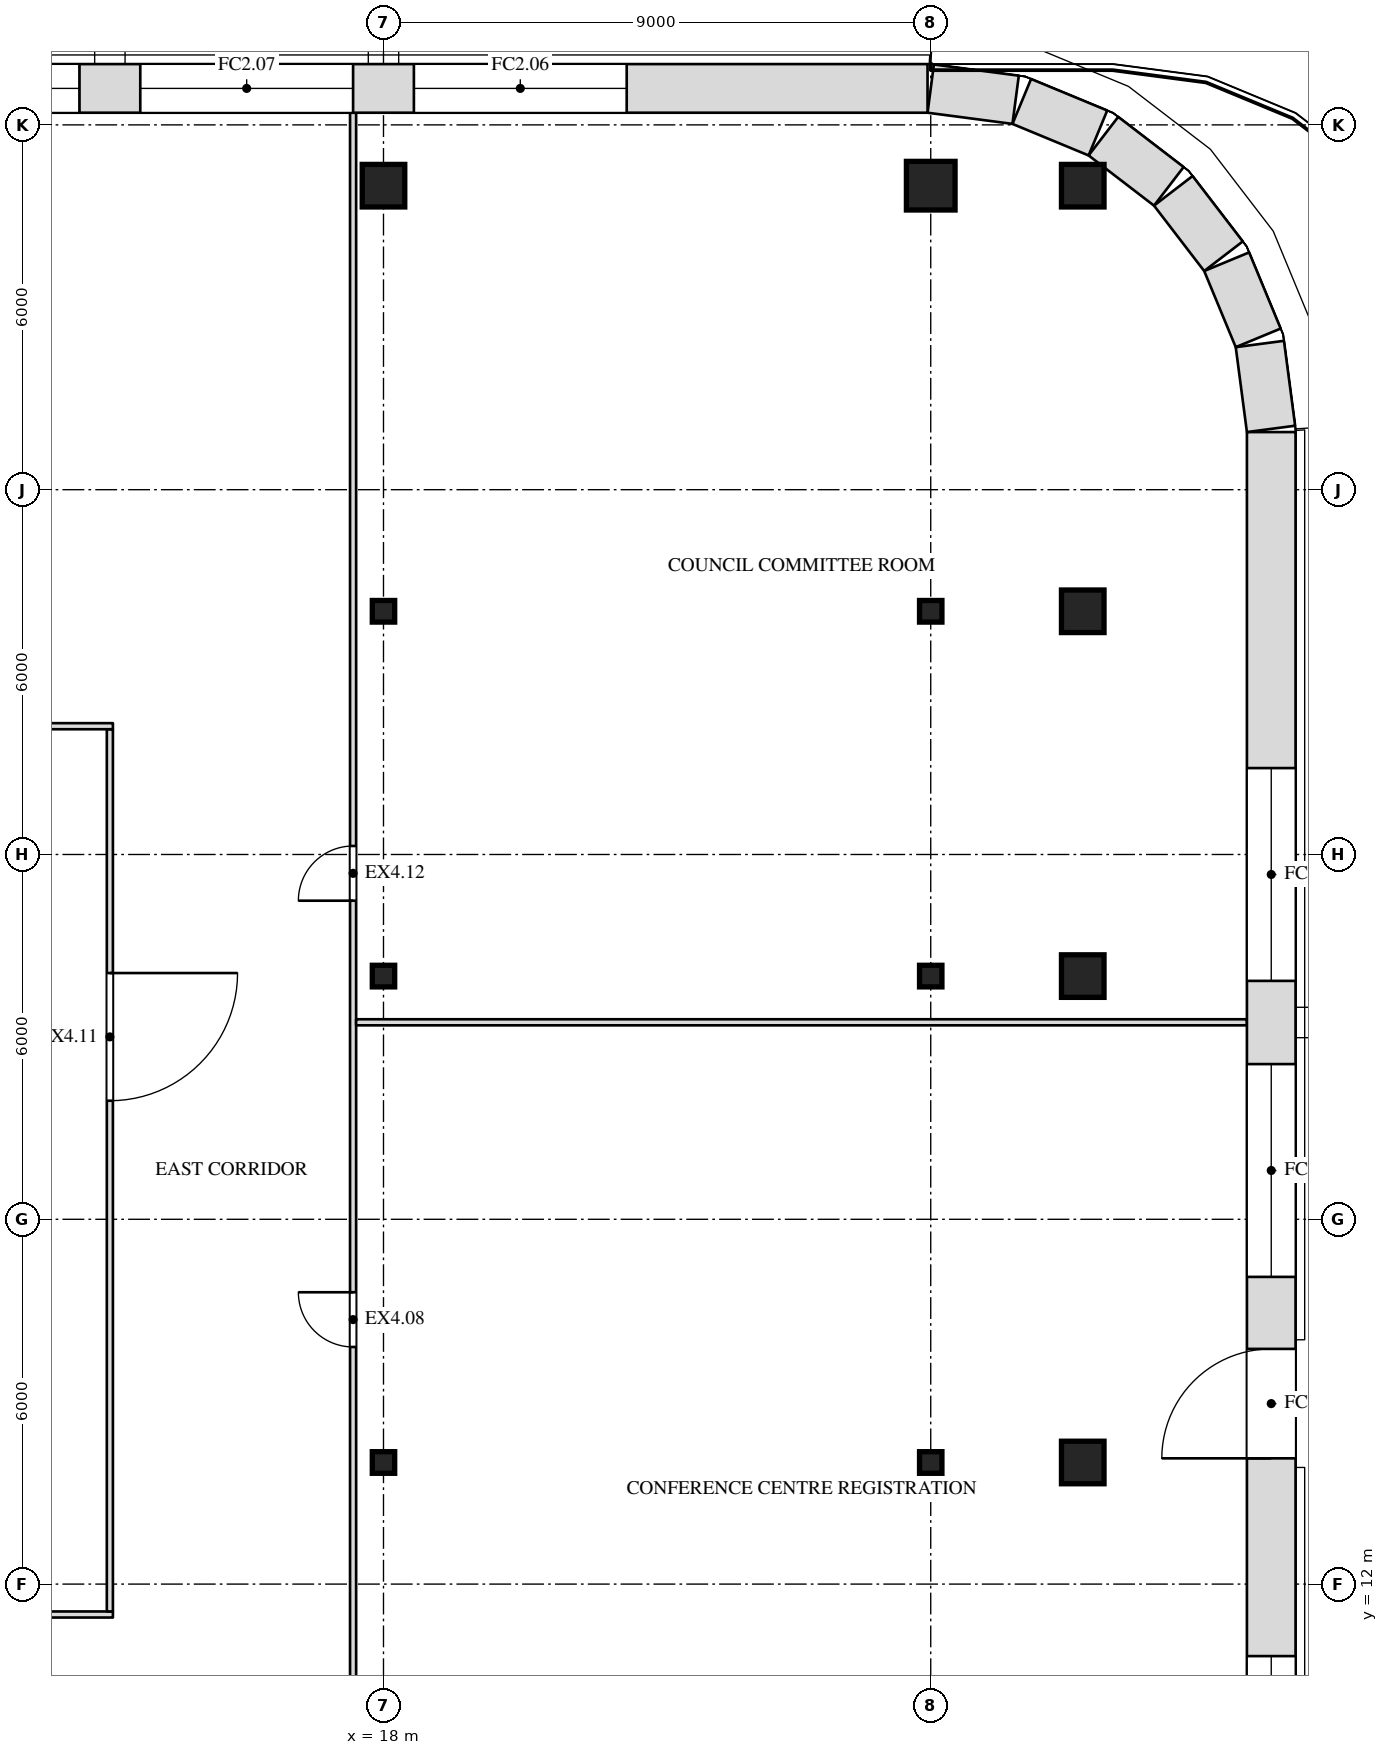
"""IFC4 building model, lengths in metres.
Left out: names, types, materials, properties, quantities, classifications, styles, units other than length and angle.
Written with IfcOpenShell. Run it as: python <this file> out.ifc"""

import sys

from ifc_helpers import new_model, si_unit, direction, frame, frame_2d, origin, origin_2d, place, context, subcontext, project, spatial, rectangle, i_section, extrude, element, fill, save


model = new_model("IFC4")
c1 = context("Model", 3, precision=1e-05, world=origin(), true_north=direction((0.0, 1.0)))
c2 = subcontext(c1, "Body", "Model", "MODEL_VIEW")
j1 = project(units=[si_unit("LENGTHUNIT", "METRE"), si_unit("PLANEANGLEUNIT", "RADIAN")], contexts=[c1])
p1 = place(None, origin())
s1 = spatial("IfcSite", under=j1, at=p1, CompositionType="ELEMENT")
p2 = place(p1, origin())
s2 = spatial("IfcBuilding", under=s1, at=p2, CompositionType="ELEMENT")
p3 = place(p2, frame((0.0, 0.0, 284.5)))
s3 = spatial("IfcBuildingStorey", under=s2, at=p3, CompositionType="ELEMENT", Elevation=284.5)
for number, where, z_axis, x_axis in (
    (1, (18.0, 14.0, 0.0), (0.0, 0.0, 1.0), (1.0, 0.0, 0.0)),
    (2, (27.0, 14.0, 0.0), (0.0, 0.0, 1.0), (1.0, 0.0, 0.0)),
):
    element("IfcColumn", number, at=place(p3, frame(where, z_axis=z_axis, x_axis=x_axis)), inside=s3, PredefinedType="COLUMN", context=c2, shape_type="SweptSolid", body=[
        extrude(i_section(OverallWidth=0.368, OverallDepth=0.356, WebThickness=0.011, FlangeThickness=0.018, at=origin_2d()), origin(), (0.0, 0.0, 1.0), 4.0),
    ])
p4 = place(p3, frame((29.5, 14.0, 0.0), z_axis=(0.0, 0.0, 1.0), x_axis=(1.0, 0.0, 0.0)))
e3 = element("IfcColumn", 3, at=p4, inside=s3, PredefinedType="COLUMN", context=c2, shape_type="SweptSolid", body=[
    extrude(rectangle(XDim=0.7, YDim=0.7, at=origin_2d()), origin(), (0.0, 0.0, 1.0), 4.0),
])
for number, where, z_axis, x_axis in (
    (4, (18.0, 22.0, 0.0), (0.0, 0.0, 1.0), (1.0, 0.0, 0.0)),
    (5, (27.0, 22.0, 0.0), (0.0, 0.0, 1.0), (1.0, 0.0, 0.0)),
):
    element("IfcColumn", number, at=place(p3, frame(where, z_axis=z_axis, x_axis=x_axis)), inside=s3, PredefinedType="COLUMN", context=c2, shape_type="SweptSolid", body=[
        extrude(i_section(OverallWidth=0.368, OverallDepth=0.356, WebThickness=0.011, FlangeThickness=0.018, at=origin_2d()), origin(), (0.0, 0.0, 1.0), 4.0),
    ])
p5 = place(p3, frame((29.5, 22.0, 0.0), z_axis=(0.0, 0.0, 1.0), x_axis=(1.0, 0.0, 0.0)))
e6 = element("IfcColumn", 6, at=p5, inside=s3, PredefinedType="COLUMN", context=c2, shape_type="SweptSolid", body=[
    extrude(rectangle(XDim=0.7, YDim=0.7, at=origin_2d()), origin(), (0.0, 0.0, 1.0), 4.0),
])
for number, where, z_axis, x_axis in (
    (7, (18.0, 28.0, 0.0), (0.0, 0.0, 1.0), (1.0, 0.0, 0.0)),
    (8, (27.0, 28.0, 0.0), (0.0, 0.0, 1.0), (1.0, 0.0, 0.0)),
):
    element("IfcColumn", number, at=place(p3, frame(where, z_axis=z_axis, x_axis=x_axis)), inside=s3, PredefinedType="COLUMN", context=c2, shape_type="SweptSolid", body=[
        extrude(i_section(OverallWidth=0.368, OverallDepth=0.356, WebThickness=0.011, FlangeThickness=0.018, at=origin_2d()), origin(), (0.0, 0.0, 1.0), 4.0),
    ])
for number, where, z_axis, x_axis in (
    (9, (29.5, 28.0, 0.0), (0.0, 0.0, 1.0), (1.0, 0.0, 0.0)),
    (10, (18.0, 35.0, 0.0), (0.0, 0.0, 1.0), (1.0, 0.0, 0.0)),
):
    element("IfcColumn", number, at=place(p3, frame(where, z_axis=z_axis, x_axis=x_axis)), inside=s3, PredefinedType="COLUMN", context=c2, shape_type="SweptSolid", body=[
        extrude(rectangle(XDim=0.7, YDim=0.7, at=origin_2d()), origin(), (0.0, 0.0, 1.0), 4.0),
    ])
p6 = place(p3, frame((27.0, 35.0, 0.0), z_axis=(0.0, 0.0, 1.0), x_axis=(1.0, 0.0, 0.0)))
e11 = element("IfcColumn", 11, at=p6, inside=s3, PredefinedType="COLUMN", context=c2, shape_type="SweptSolid", body=[
    extrude(rectangle(XDim=0.8, YDim=0.8, at=origin_2d()), origin(), (0.0, 0.0, 1.0), 4.0),
])
p7 = place(p3, frame((29.5, 35.0, 0.0), z_axis=(0.0, 0.0, 1.0), x_axis=(1.0, 0.0, 0.0)))
e12 = element("IfcColumn", 12, at=p7, inside=s3, PredefinedType="COLUMN", context=c2, shape_type="SweptSolid", body=[
    extrude(rectangle(XDim=0.7, YDim=0.7, at=origin_2d()), origin(), (0.0, 0.0, 1.0), 4.0),
])
p8 = place(p3, frame((17.5, 6.68, 0.0), z_axis=(0.0, 0.0, 1.0), x_axis=(0.0, 1.0, 0.0)))
e13 = element("IfcWall", 13, at=p8, inside=s3, PredefinedType="PARTITIONING", context=c2, shape_type="SweptSolid", body=[
    extrude(rectangle(XDim=29.52, YDim=0.1, at=frame_2d((14.76, 0.0))), origin(), (0.0, 0.0, 1.0), 3.78),
])
p9 = place(p8, frame((9.22, 0.0, 0.0)))
e14 = element("IfcOpeningElement", 14, at=p9, cuts=e13, PredefinedType="OPENING", context=c2, shape_type="SweptSolid", body=[
    extrude(rectangle(XDim=0.9, YDim=2.1, at=frame_2d((0.45, 1.05))), frame((0.0, 0.062, 0.0), z_axis=(0.0, -1.0, 0.0), x_axis=(1.0, 0.0, 0.0)), (0.0, 0.0, 1.0), 0.124),
])
p10 = place(p8, frame((16.56, 0.0, 0.0)))
e15 = element("IfcOpeningElement", 15, at=p10, cuts=e13, PredefinedType="OPENING", context=c2, shape_type="SweptSolid", body=[
    extrude(rectangle(XDim=0.9, YDim=2.1, at=frame_2d((0.45, 1.05))), frame((0.0, 0.062, 0.0), z_axis=(0.0, -1.0, 0.0), x_axis=(1.0, 0.0, 0.0)), (0.0, 0.0, 1.0), 0.124),
])
p11 = place(p3, frame((-13.55, 11.5, 0.0), z_axis=(0.0, 0.0, 1.0), x_axis=(1.0, 0.0, 0.0)))
e16 = element("IfcWall", 16, at=p11, inside=s3, PredefinedType="PARTITIONING", context=c2, shape_type="SweptSolid", body=[
    extrude(rectangle(XDim=27.1, YDim=0.1, at=frame_2d((13.55, 0.0))), origin(), (0.0, 0.0, 1.0), 3.78),
])
p12 = place(p11, frame((3.5, 0.0, 0.0)))
e17 = element("IfcOpeningElement", 17, at=p12, cuts=e16, PredefinedType="OPENING", context=c2, shape_type="SweptSolid", body=[
    extrude(rectangle(XDim=2.1, YDim=2.4, at=frame_2d((1.05, 1.2))), frame((0.0, 0.062, 0.0), z_axis=(0.0, -1.0, 0.0), x_axis=(1.0, 0.0, 0.0)), (0.0, 0.0, 1.0), 0.124),
])
p13 = place(p3, frame((13.5, 11.55, 0.0), z_axis=(0.0, 0.0, 1.0), x_axis=(0.0, 1.0, 0.0)))
e18 = element("IfcWall", 18, at=p13, inside=s3, PredefinedType="PARTITIONING", context=c2, shape_type="SweptSolid", body=[
    extrude(rectangle(XDim=14.51, YDim=0.1, at=frame_2d((7.255, 0.0))), origin(), (0.0, 0.0, 1.0), 3.247),
])
p14 = place(p13, frame((8.4, 0.0, 0.0)))
e19 = element("IfcOpeningElement", 19, at=p14, cuts=e18, PredefinedType="OPENING", context=c2, shape_type="SweptSolid", body=[
    extrude(rectangle(XDim=2.1, YDim=2.4, at=frame_2d((1.05, 1.2))), frame((0.0, 0.062, 0.0), z_axis=(0.0, -1.0, 0.0), x_axis=(1.0, 0.0, 0.0)), (0.0, 0.0, 1.0), 0.124),
])
p15 = place(p3, frame((17.55, 21.24, 0.0), z_axis=(0.0, 0.0, 1.0), x_axis=(1.0, 0.0, 0.0)))
e20 = element("IfcWall", 20, at=p15, inside=s3, PredefinedType="PARTITIONING", context=c2, shape_type="SweptSolid", body=[
    extrude(rectangle(XDim=14.65, YDim=0.1, at=frame_2d((7.325, 0.0))), origin(), (0.0, 0.0, 1.0), 3.78),
])
p16 = place(p3, frame((-13.55, 26.11, 0.0), z_axis=(0.0, 0.0, 1.0), x_axis=(1.0, 0.0, 0.0)))
e21 = element("IfcWall", 21, at=p16, inside=s3, PredefinedType="PARTITIONING", context=c2, shape_type="SweptSolid", body=[
    extrude(rectangle(XDim=27.1, YDim=0.1, at=frame_2d((13.55, 0.0))), origin(), (0.0, 0.0, 1.0), 3.78),
])
p17 = place(p16, frame((21.5, 0.0, 0.0)))
e22 = element("IfcOpeningElement", 22, at=p17, cuts=e21, PredefinedType="OPENING", context=c2, shape_type="SweptSolid", body=[
    extrude(rectangle(XDim=2.1, YDim=2.4, at=frame_2d((1.05, 1.2))), frame((0.0, 0.062, 0.0), z_axis=(0.0, -1.0, 0.0), x_axis=(1.0, 0.0, 0.0)), (0.0, 0.0, 1.0), 0.124),
])
p18 = place(p3, frame((32.6, -7.948, 0.0), z_axis=(0.0, 0.0, 1.0), x_axis=(0.0, 1.0, 0.0)))
e23 = element("IfcWall", 23, at=p18, inside=s3, PredefinedType="SOLIDWALL", context=c2, shape_type="SweptSolid", body=[
    extrude(rectangle(XDim=38.895, YDim=0.8, at=frame_2d((19.448, 0.0))), origin(), (0.0, 0.0, 1.0), 3.78),
])
p19 = place(p18, frame((5.526, 0.0, 1.0)))
e24 = element("IfcOpeningElement", 24, at=p19, cuts=e23, PredefinedType="OPENING", context=c2, shape_type="SweptSolid", body=[
    extrude(rectangle(XDim=3.5, YDim=2.5, at=frame_2d((1.75, 1.25))), frame((0.0, 0.412, 0.0), z_axis=(0.0, -1.0, 0.0), x_axis=(1.0, 0.0, 0.0)), (0.0, 0.0, 1.0), 0.824),
])
p20 = place(p18, frame((10.395, 0.0, 1.0)))
e25 = element("IfcOpeningElement", 25, at=p20, cuts=e23, PredefinedType="OPENING", context=c2, shape_type="SweptSolid", body=[
    extrude(rectangle(XDim=3.5, YDim=2.5, at=frame_2d((1.75, 1.25))), frame((0.0, 0.412, 0.0), z_axis=(0.0, -1.0, 0.0), x_axis=(1.0, 0.0, 0.0)), (0.0, 0.0, 1.0), 0.824),
])
p21 = place(p18, frame((15.263, 0.0, 1.0)))
e26 = element("IfcOpeningElement", 26, at=p21, cuts=e23, PredefinedType="OPENING", context=c2, shape_type="SweptSolid", body=[
    extrude(rectangle(XDim=3.5, YDim=2.5, at=frame_2d((1.75, 1.25))), frame((0.0, 0.412, 0.0), z_axis=(0.0, -1.0, 0.0), x_axis=(1.0, 0.0, 0.0)), (0.0, 0.0, 1.0), 0.824),
])
p22 = place(p18, frame((25.0, 0.0, 1.0)))
e27 = element("IfcOpeningElement", 27, at=p22, cuts=e23, PredefinedType="OPENING", context=c2, shape_type="SweptSolid", body=[
    extrude(rectangle(XDim=3.5, YDim=2.5, at=frame_2d((1.75, 1.25))), frame((0.0, 0.412, 0.0), z_axis=(0.0, -1.0, 0.0), x_axis=(1.0, 0.0, 0.0)), (0.0, 0.0, 1.0), 0.824),
])
p23 = place(p18, frame((29.869, 0.0, 1.0)))
e28 = element("IfcOpeningElement", 28, at=p23, cuts=e23, PredefinedType="OPENING", context=c2, shape_type="SweptSolid", body=[
    extrude(rectangle(XDim=3.5, YDim=2.5, at=frame_2d((1.75, 1.25))), frame((0.0, 0.412, 0.0), z_axis=(0.0, -1.0, 0.0), x_axis=(1.0, 0.0, 0.0)), (0.0, 0.0, 1.0), 0.824),
])
p24 = place(p18, frame((22.016, 0.0, 0.0)))
e29 = element("IfcOpeningElement", 29, at=p24, cuts=e23, PredefinedType="OPENING", context=c2, shape_type="SweptSolid", body=[
    extrude(rectangle(XDim=1.8, YDim=2.4, at=frame_2d((0.9, 1.2))), frame((0.0, 0.412, 0.0), z_axis=(0.0, -1.0, 0.0), x_axis=(1.0, 0.0, 0.0)), (0.0, 0.0, 1.0), 0.824),
])
p25 = place(p3, frame((32.597, 31.0, 0.0), z_axis=(0.0, 0.0, 1.0), x_axis=(-0.130517283865, 0.99144603414, 0.0)))
e30 = element("IfcWall", 30, at=p25, inside=s3, PredefinedType="SOLIDWALL", context=c2, shape_type="SweptSolid", body=[
    extrude(rectangle(XDim=1.408, YDim=0.8, at=frame_2d((0.704, 0.0))), origin(), (0.0, 0.0, 1.0), 3.78),
])
p26 = place(p3, frame((32.386, 32.497, 0.0), z_axis=(0.0, 0.0, 1.0), x_axis=(-0.38276009378, 0.923847774587, 0.0)))
e31 = element("IfcWall", 31, at=p26, inside=s3, PredefinedType="SOLIDWALL", context=c2, shape_type="SweptSolid", body=[
    extrude(rectangle(XDim=1.355, YDim=0.8, at=frame_2d((0.678, 0.0))), origin(), (0.0, 0.0, 1.0), 3.78),
])
for number, where, z_axis, x_axis in (
    (32, (31.815, 33.84, 0.0), (0.0, 0.0, 1.0), (-0.609, 0.793, 0.0)),
    (33, (30.916, 34.989, 0.0), (0.0, 0.0, 1.0), (-0.793, 0.609, 0.0)),
):
    element("IfcWall", number, at=place(p3, frame(where, z_axis=z_axis, x_axis=x_axis)), inside=s3, PredefinedType="SOLIDWALL", context=c2, shape_type="SweptSolid", body=[
        extrude(rectangle(XDim=1.356, YDim=0.8, at=frame_2d((0.678, 0.0))), origin(), (0.0, 0.0, 1.0), 3.78),
    ])
p27 = place(p3, frame((29.75, 35.867, 0.0), z_axis=(0.0, 0.0, 1.0), x_axis=(-0.923847774587, 0.38276009378, 0.0)))
e34 = element("IfcWall", 34, at=p27, inside=s3, PredefinedType="SOLIDWALL", context=c2, shape_type="SweptSolid", body=[
    extrude(rectangle(XDim=1.355, YDim=0.8, at=frame_2d((0.678, 0.0))), origin(), (0.0, 0.0, 1.0), 3.78),
])
p28 = place(p3, frame((28.396, 36.413, 0.0), z_axis=(0.0, 0.0, 1.0), x_axis=(-0.99144603414, 0.130517283865, 0.0)))
e35 = element("IfcWall", 35, at=p28, inside=s3, PredefinedType="SOLIDWALL", context=c2, shape_type="SweptSolid", body=[
    extrude(rectangle(XDim=1.408, YDim=0.8, at=frame_2d((0.704, 0.0))), origin(), (0.0, 0.0, 1.0), 3.78),
])
p29 = place(p3, frame((26.948, 36.6, 0.0), z_axis=(0.0, 0.0, 1.0), x_axis=(-1.0, 0.0, 0.0)))
e36 = element("IfcWall", 36, at=p29, inside=s3, PredefinedType="SOLIDWALL", context=c2, shape_type="SweptSolid", body=[
    extrude(rectangle(XDim=53.895, YDim=0.8, at=frame_2d((26.948, 0.0))), origin(), (0.0, 0.0, 1.0), 3.78),
])
p30 = place(p29, frame((4.948, 0.0, 1.0)))
e37 = element("IfcOpeningElement", 37, at=p30, cuts=e36, PredefinedType="OPENING", context=c2, shape_type="SweptSolid", body=[
    extrude(rectangle(XDim=3.5, YDim=2.5, at=frame_2d((1.75, 1.25))), frame((0.0, 0.412, 0.0), z_axis=(0.0, -1.0, 0.0), x_axis=(1.0, 0.0, 0.0)), (0.0, 0.0, 1.0), 0.824),
])
p31 = place(p29, frame((9.448, 0.0, 1.0)))
e38 = element("IfcOpeningElement", 38, at=p31, cuts=e36, PredefinedType="OPENING", context=c2, shape_type="SweptSolid", body=[
    extrude(rectangle(XDim=3.5, YDim=2.5, at=frame_2d((1.75, 1.25))), frame((0.0, 0.412, 0.0), z_axis=(0.0, -1.0, 0.0), x_axis=(1.0, 0.0, 0.0)), (0.0, 0.0, 1.0), 0.824),
])
p32 = place(p29, frame((13.948, 0.0, 1.0)))
e39 = element("IfcOpeningElement", 39, at=p32, cuts=e36, PredefinedType="OPENING", context=c2, shape_type="SweptSolid", body=[
    extrude(rectangle(XDim=3.5, YDim=2.5, at=frame_2d((1.75, 1.25))), frame((0.0, 0.412, 0.0), z_axis=(0.0, -1.0, 0.0), x_axis=(1.0, 0.0, 0.0)), (0.0, 0.0, 1.0), 0.824),
])
p33 = place(p29, frame((18.448, 0.0, 1.0)))
e40 = element("IfcOpeningElement", 40, at=p33, cuts=e36, PredefinedType="OPENING", context=c2, shape_type="SweptSolid", body=[
    extrude(rectangle(XDim=3.5, YDim=2.5, at=frame_2d((1.75, 1.25))), frame((0.0, 0.412, 0.0), z_axis=(0.0, -1.0, 0.0), x_axis=(1.0, 0.0, 0.0)), (0.0, 0.0, 1.0), 0.824),
])
p34 = place(p29, frame((22.948, 0.0, 1.0)))
e41 = element("IfcOpeningElement", 41, at=p34, cuts=e36, PredefinedType="OPENING", context=c2, shape_type="SweptSolid", body=[
    extrude(rectangle(XDim=3.5, YDim=2.5, at=frame_2d((1.75, 1.25))), frame((0.0, 0.412, 0.0), z_axis=(0.0, -1.0, 0.0), x_axis=(1.0, 0.0, 0.0)), (0.0, 0.0, 1.0), 0.824),
])
p35 = place(p29, frame((27.448, 0.0, 1.0)))
e42 = element("IfcOpeningElement", 42, at=p35, cuts=e36, PredefinedType="OPENING", context=c2, shape_type="SweptSolid", body=[
    extrude(rectangle(XDim=3.5, YDim=2.5, at=frame_2d((1.75, 1.25))), frame((0.0, 0.412, 0.0), z_axis=(0.0, -1.0, 0.0), x_axis=(1.0, 0.0, 0.0)), (0.0, 0.0, 1.0), 0.824),
])
p36 = place(p29, frame((31.948, 0.0, 1.0)))
e43 = element("IfcOpeningElement", 43, at=p36, cuts=e36, PredefinedType="OPENING", context=c2, shape_type="SweptSolid", body=[
    extrude(rectangle(XDim=3.5, YDim=2.5, at=frame_2d((1.75, 1.25))), frame((0.0, 0.412, 0.0), z_axis=(0.0, -1.0, 0.0), x_axis=(1.0, 0.0, 0.0)), (0.0, 0.0, 1.0), 0.824),
])
p37 = place(p29, frame((36.448, 0.0, 1.0)))
e44 = element("IfcOpeningElement", 44, at=p37, cuts=e36, PredefinedType="OPENING", context=c2, shape_type="SweptSolid", body=[
    extrude(rectangle(XDim=3.5, YDim=2.5, at=frame_2d((1.75, 1.25))), frame((0.0, 0.412, 0.0), z_axis=(0.0, -1.0, 0.0), x_axis=(1.0, 0.0, 0.0)), (0.0, 0.0, 1.0), 0.824),
])
p38 = place(p29, frame((40.948, 0.0, 1.0)))
e45 = element("IfcOpeningElement", 45, at=p38, cuts=e36, PredefinedType="OPENING", context=c2, shape_type="SweptSolid", body=[
    extrude(rectangle(XDim=3.5, YDim=2.5, at=frame_2d((1.75, 1.25))), frame((0.0, 0.412, 0.0), z_axis=(0.0, -1.0, 0.0), x_axis=(1.0, 0.0, 0.0)), (0.0, 0.0, 1.0), 0.824),
])
p39 = place(p29, frame((45.448, 0.0, 1.0)))
e46 = element("IfcOpeningElement", 46, at=p39, cuts=e36, PredefinedType="OPENING", context=c2, shape_type="SweptSolid", body=[
    extrude(rectangle(XDim=3.5, YDim=2.5, at=frame_2d((1.75, 1.25))), frame((0.0, 0.412, 0.0), z_axis=(0.0, -1.0, 0.0), x_axis=(1.0, 0.0, 0.0)), (0.0, 0.0, 1.0), 0.824),
])
p40 = place(p9, origin())
e47 = element("IfcDoor", 47, at=p40, inside=s3, OperationType="SINGLE_SWING_RIGHT", PredefinedType="DOOR", context=c2, shape_type="SweptSolid", body=[
    extrude(rectangle(XDim=0.9, YDim=2.1, at=frame_2d((0.45, 1.05))), frame((0.0, 0.025, 0.0), z_axis=(0.0, -1.0, 0.0), x_axis=(1.0, 0.0, 0.0)), (0.0, 0.0, 1.0), 0.05),
])
fill(e14, e47)
p41 = place(p14, origin())
e48 = element("IfcDoor", 48, at=p41, inside=s3, OperationType="DOUBLE_DOOR_SINGLE_SWING", PredefinedType="DOOR", context=c2, shape_type="SweptSolid", body=[
    extrude(rectangle(XDim=2.1, YDim=2.4, at=frame_2d((1.05, 1.2))), frame((0.0, 0.025, 0.0), z_axis=(0.0, -1.0, 0.0), x_axis=(1.0, 0.0, 0.0)), (0.0, 0.0, 1.0), 0.05),
])
fill(e19, e48)
p42 = place(p10, origin())
e49 = element("IfcDoor", 49, at=p42, inside=s3, OperationType="SINGLE_SWING_LEFT", PredefinedType="DOOR", context=c2, shape_type="SweptSolid", body=[
    extrude(rectangle(XDim=0.9, YDim=2.1, at=frame_2d((0.45, 1.05))), frame((0.0, 0.025, 0.0), z_axis=(0.0, -1.0, 0.0), x_axis=(1.0, 0.0, 0.0)), (0.0, 0.0, 1.0), 0.05),
])
fill(e15, e49)
p43 = place(p21, origin())
e50 = element("IfcWindow", 50, at=p43, inside=s3, PartitioningType="SINGLE_PANEL", PredefinedType="WINDOW", context=c2, shape_type="SweptSolid", body=[
    extrude(rectangle(XDim=3.5, YDim=2.5, at=frame_2d((1.75, 1.25))), frame((0.0, 0.03, 0.0), z_axis=(0.0, -1.0, 0.0), x_axis=(1.0, 0.0, 0.0)), (0.0, 0.0, 1.0), 0.06),
])
fill(e26, e50)
p44 = place(p22, origin())
e51 = element("IfcWindow", 51, at=p44, inside=s3, PartitioningType="SINGLE_PANEL", PredefinedType="WINDOW", context=c2, shape_type="SweptSolid", body=[
    extrude(rectangle(XDim=3.5, YDim=2.5, at=frame_2d((1.75, 1.25))), frame((0.0, 0.03, 0.0), z_axis=(0.0, -1.0, 0.0), x_axis=(1.0, 0.0, 0.0)), (0.0, 0.0, 1.0), 0.06),
])
fill(e27, e51)
p45 = place(p23, origin())
e52 = element("IfcWindow", 52, at=p45, inside=s3, PartitioningType="SINGLE_PANEL", PredefinedType="WINDOW", context=c2, shape_type="SweptSolid", body=[
    extrude(rectangle(XDim=3.5, YDim=2.5, at=frame_2d((1.75, 1.25))), frame((0.0, 0.03, 0.0), z_axis=(0.0, -1.0, 0.0), x_axis=(1.0, 0.0, 0.0)), (0.0, 0.0, 1.0), 0.06),
])
fill(e28, e52)
p46 = place(p30, origin())
e53 = element("IfcWindow", 53, at=p46, inside=s3, PartitioningType="SINGLE_PANEL", PredefinedType="WINDOW", context=c2, shape_type="SweptSolid", body=[
    extrude(rectangle(XDim=3.5, YDim=2.5, at=frame_2d((1.75, 1.25))), frame((0.0, 0.03, 0.0), z_axis=(0.0, -1.0, 0.0), x_axis=(1.0, 0.0, 0.0)), (0.0, 0.0, 1.0), 0.06),
])
fill(e37, e53)
p47 = place(p31, origin())
e54 = element("IfcWindow", 54, at=p47, inside=s3, PartitioningType="SINGLE_PANEL", PredefinedType="WINDOW", context=c2, shape_type="SweptSolid", body=[
    extrude(rectangle(XDim=3.5, YDim=2.5, at=frame_2d((1.75, 1.25))), frame((0.0, 0.03, 0.0), z_axis=(0.0, -1.0, 0.0), x_axis=(1.0, 0.0, 0.0)), (0.0, 0.0, 1.0), 0.06),
])
fill(e38, e54)
p48 = place(p32, origin())
e55 = element("IfcWindow", 55, at=p48, inside=s3, PartitioningType="SINGLE_PANEL", PredefinedType="WINDOW", context=c2, shape_type="SweptSolid", body=[
    extrude(rectangle(XDim=3.5, YDim=2.5, at=frame_2d((1.75, 1.25))), frame((0.0, 0.03, 0.0), z_axis=(0.0, -1.0, 0.0), x_axis=(1.0, 0.0, 0.0)), (0.0, 0.0, 1.0), 0.06),
])
fill(e39, e55)
p49 = place(p24, origin())
e56 = element("IfcDoor", 56, at=p49, inside=s3, OperationType="DOUBLE_DOOR_SINGLE_SWING", PredefinedType="DOOR", context=c2, shape_type="SweptSolid", body=[
    extrude(rectangle(XDim=1.8, YDim=2.4, at=frame_2d((0.9, 1.2))), frame((0.0, 0.025, 0.0), z_axis=(0.0, -1.0, 0.0), x_axis=(1.0, 0.0, 0.0)), (0.0, 0.0, 1.0), 0.05),
])
fill(e29, e56)
save(model, sys.argv[1])
